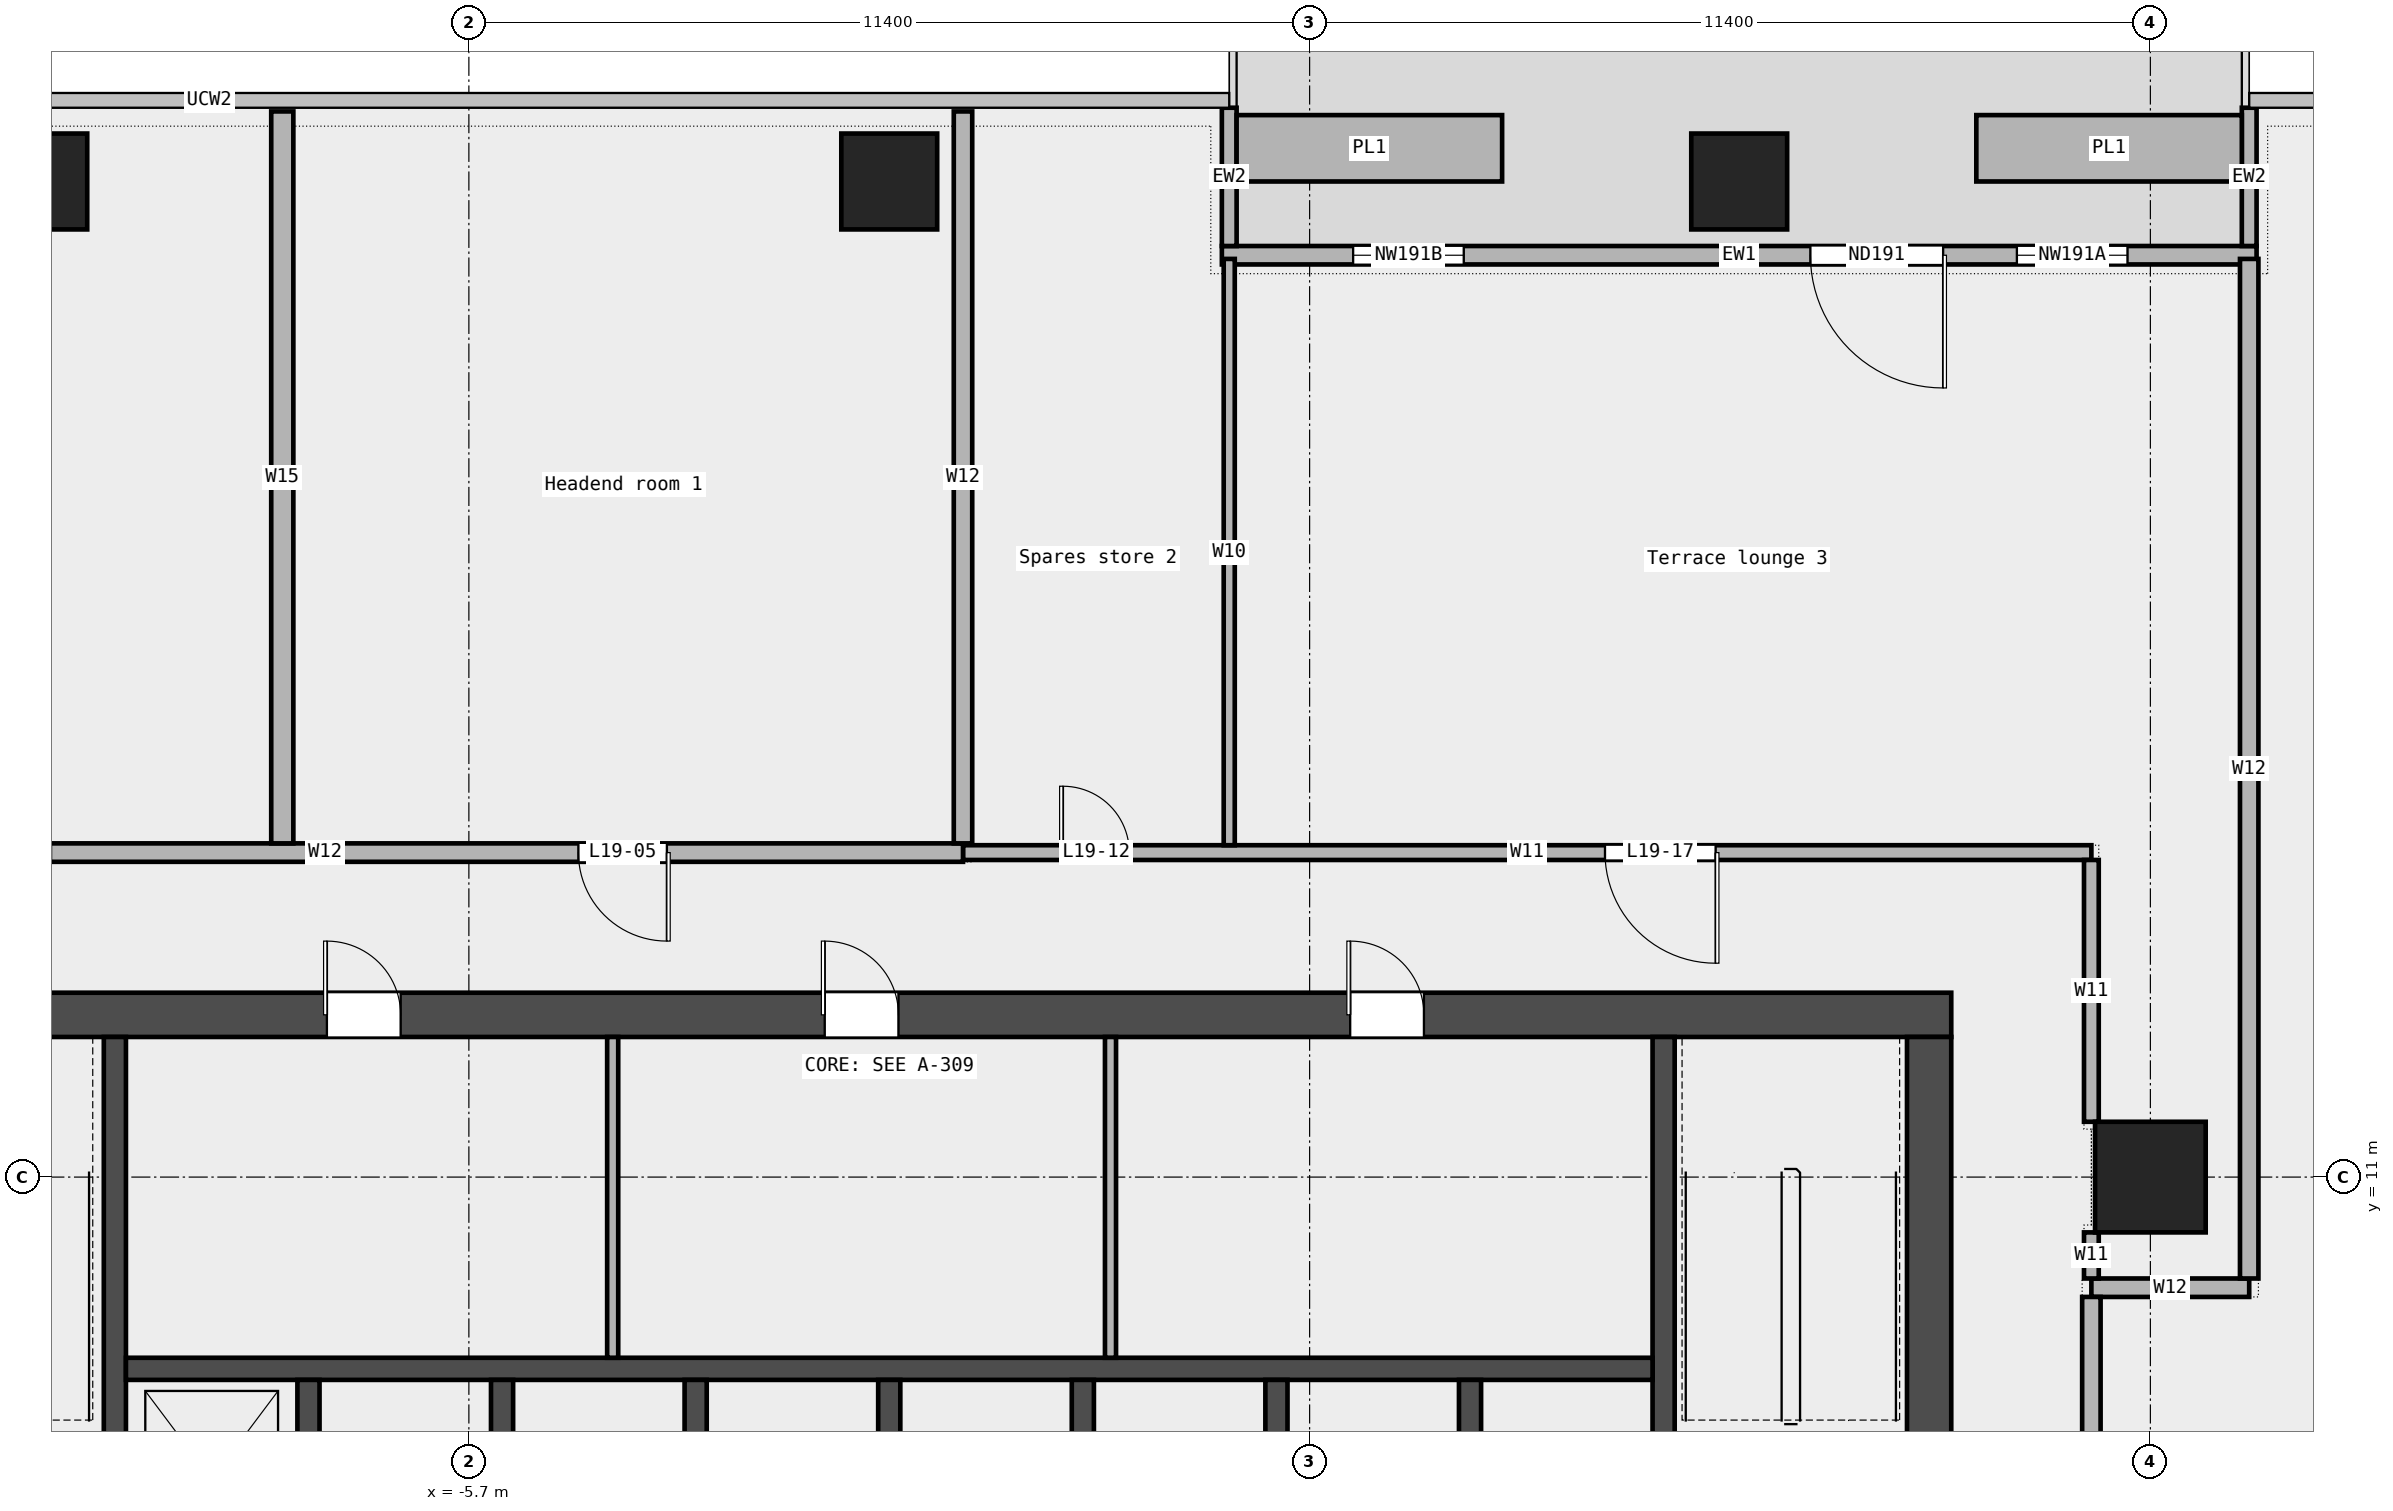
"""IFC4 building model, lengths in metres.
Left out: names, types, materials, properties, quantities, classifications, styles, units other than length and angle.
Written with IfcOpenShell. Run it as: python <this file> out.ifc"""

import sys

from ifc_helpers import new_model, si_unit, direction, frame, frame_2d, origin, origin_2d, place, context, subcontext, project, spatial, rectangle, extrude, element, fill, save


model = new_model("IFC4")
c1 = context("Model", 3, precision=1e-05, world=origin(), true_north=direction((0.0, 1.0)))
c2 = subcontext(c1, "Body", "Model", "MODEL_VIEW")
j1 = project(units=[si_unit("LENGTHUNIT", "METRE"), si_unit("PLANEANGLEUNIT", "RADIAN")], contexts=[c1])
p1 = place(None, origin())
s1 = spatial("IfcSite", under=j1, at=p1, CompositionType="ELEMENT")
p2 = place(p1, origin())
s2 = spatial("IfcBuilding", under=s1, at=p2, CompositionType="ELEMENT")
p3 = place(p2, frame((0.0, 0.0, 99.1)))
s3 = spatial("IfcBuildingStorey", under=s2, at=p3, CompositionType="ELEMENT", Elevation=99.1)
for number, where, z_axis, x_axis in (
    (1, (11.525, 24.5, 0.0), (0.0, 0.0, 1.0), (1.0, 0.0, 0.0)),
    (2, (0.0, 24.5, 0.0), (0.0, 0.0, 1.0), (1.0, 0.0, 0.0)),
    (3, (-11.525, 24.5, 0.0), (0.0, 0.0, 1.0), (1.0, 0.0, 0.0)),
):
    element("IfcColumn", number, at=place(p3, frame(where, z_axis=z_axis, x_axis=x_axis)), inside=s3, PredefinedType="COLUMN", context=c2, shape_type="SweptSolid", body=[
        extrude(rectangle(XDim=1.3, YDim=1.3, at=origin_2d()), origin(), (0.0, 0.0, 1.0), 4.05),
    ])
p4 = place(p3, frame((17.1, 11.0, 0.0), z_axis=(0.0, 0.0, 1.0), x_axis=(1.0, 0.0, 0.0)))
e4 = element("IfcColumn", 4, at=p4, inside=s3, PredefinedType="COLUMN", context=c2, shape_type="SweptSolid", body=[
    extrude(rectangle(XDim=1.5, YDim=1.5, at=origin_2d()), origin(), (0.0, 0.0, 1.0), 4.05),
])
p5 = place(p3, frame((18.54, 23.5, 0.0), z_axis=(0.0, 0.0, 1.0), x_axis=(-1.0, 0.0, 0.0)))
e5 = element("IfcWall", 5, at=p5, inside=s3, PredefinedType="STANDARD", context=c2, shape_type="SweptSolid", body=[
    extrude(rectangle(XDim=14.03, YDim=0.25, at=frame_2d((7.015, 0.0))), origin(), (0.0, 0.0, 1.0), 4.05),
])
p6 = place(p5, frame((1.75, 0.0, 0.45)))
e6 = element("IfcOpeningElement", 6, at=p6, cuts=e5, PredefinedType="OPENING", context=c2, shape_type="SweptSolid", body=[
    extrude(rectangle(XDim=1.5, YDim=3.0, at=frame_2d((0.75, 1.5))), frame((0.0, 0.137, 0.0), z_axis=(0.0, -1.0, 0.0), x_axis=(1.0, 0.0, 0.0)), (0.0, 0.0, 1.0), 0.274),
])
p7 = place(p5, frame((4.25, 0.0, 0.0)))
e7 = element("IfcOpeningElement", 7, at=p7, cuts=e5, PredefinedType="OPENING", context=c2, shape_type="SweptSolid", body=[
    extrude(rectangle(XDim=1.8, YDim=2.4, at=frame_2d((0.9, 1.2))), frame((0.0, 0.137, 0.0), z_axis=(0.0, -1.0, 0.0), x_axis=(1.0, 0.0, 0.0)), (0.0, 0.0, 1.0), 0.274),
])
p8 = place(p5, frame((10.75, 0.0, 0.45)))
e8 = element("IfcOpeningElement", 8, at=p8, cuts=e5, PredefinedType="OPENING", context=c2, shape_type="SweptSolid", body=[
    extrude(rectangle(XDim=1.5, YDim=3.0, at=frame_2d((0.75, 1.5))), frame((0.0, 0.137, 0.0), z_axis=(0.0, -1.0, 0.0), x_axis=(1.0, 0.0, 0.0)), (0.0, 0.0, 1.0), 0.274),
])
for number, where, z_axis, x_axis in (
    (9, (18.44, 25.5, 0.0), (0.0, 0.0, 1.0), (0.0, -1.0, 0.0)),
    (10, (4.61, 25.5, 0.0), (0.0, 0.0, 1.0), (0.0, -1.0, 0.0)),
):
    element("IfcWall", number, at=place(p3, frame(where, z_axis=z_axis, x_axis=x_axis)), inside=s3, PredefinedType="STANDARD", context=c2, shape_type="SweptSolid", body=[
        extrude(rectangle(XDim=1.875, YDim=0.2, at=frame_2d((0.938, 0.0))), origin(), (0.0, 0.0, 1.0), 4.05),
    ])
for number, where, z_axis, x_axis in (
    (11, (18.34, 24.95, 0.0), (0.0, 0.0, 1.0), (-1.0, 0.0, 0.0)),
    (12, (8.31, 24.95, 0.0), (0.0, 0.0, 1.0), (-1.0, 0.0, 0.0)),
):
    element("IfcWall", number, at=place(p3, frame(where, z_axis=z_axis, x_axis=x_axis)), inside=s3, PredefinedType="STANDARD", context=c2, shape_type="SweptSolid", body=[
        extrude(rectangle(XDim=3.6, YDim=0.9, at=frame_2d((1.8, 0.0))), origin(), (0.0, 0.0, 1.0), 0.7),
    ])
p9 = place(p3, frame((16.3, 9.5, 0.0), z_axis=(0.0, 0.0, 1.0), x_axis=(1.0, 0.0, 0.0)))
e13 = element("IfcWall", 13, at=p9, inside=s3, PredefinedType="PARTITIONING", context=c2, shape_type="SweptSolid", body=[
    extrude(rectangle(XDim=2.14, YDim=0.25, at=frame_2d((1.07, 0.0))), origin(), (0.0, 0.0, 1.0), 4.05),
])
p10 = place(p3, frame((1.0, 15.4, 0.0), z_axis=(0.0, 0.0, 1.0), x_axis=(1.0, 0.0, 0.0)))
e14 = element("IfcWall", 14, at=p10, inside=s3, PredefinedType="PARTITIONING", context=c2, shape_type="SweptSolid", body=[
    extrude(rectangle(XDim=15.3, YDim=0.2, at=frame_2d((7.65, 0.0))), origin(), (0.0, 0.0, 1.0), 4.05),
])
p11 = place(p10, frame((1.355, 0.0, 0.0)))
e15 = element("IfcOpeningElement", 15, at=p11, cuts=e14, PredefinedType="OPENING", context=c2, shape_type="SweptSolid", body=[
    extrude(rectangle(XDim=0.9, YDim=2.1, at=frame_2d((0.45, 1.05))), frame((0.0, 0.112, 0.0), z_axis=(0.0, -1.0, 0.0), x_axis=(1.0, 0.0, 0.0)), (0.0, 0.0, 1.0), 0.224),
])
p12 = place(p10, frame((8.705, 0.0, 0.0)))
e16 = element("IfcOpeningElement", 16, at=p12, cuts=e14, PredefinedType="OPENING", context=c2, shape_type="SweptSolid", body=[
    extrude(rectangle(XDim=1.5, YDim=2.1, at=frame_2d((0.75, 1.05))), frame((0.0, 0.112, 0.0), z_axis=(0.0, -1.0, 0.0), x_axis=(1.0, 0.0, 0.0)), (0.0, 0.0, 1.0), 0.224),
])
p13 = place(p3, frame((-16.3, 15.4, 0.0), z_axis=(0.0, 0.0, 1.0), x_axis=(1.0, 0.0, 0.0)))
e17 = element("IfcWall", 17, at=p13, inside=s3, PredefinedType="PARTITIONING", context=c2, shape_type="SweptSolid", body=[
    extrude(rectangle(XDim=17.3, YDim=0.25, at=frame_2d((8.65, 0.0))), origin(), (0.0, 0.0, 1.0), 4.05),
])
p14 = place(p13, frame((12.085, 0.0, 0.0)))
e18 = element("IfcOpeningElement", 18, at=p14, cuts=e17, PredefinedType="OPENING", context=c2, shape_type="SweptSolid", body=[
    extrude(rectangle(XDim=1.2, YDim=2.1, at=frame_2d((0.6, 1.05))), frame((0.0, 0.137, 0.0), z_axis=(0.0, -1.0, 0.0), x_axis=(1.0, 0.0, 0.0)), (0.0, 0.0, 1.0), 0.274),
])
p15 = place(p13, frame((3.135, 0.0, 0.0)))
e19 = element("IfcOpeningElement", 19, at=p15, cuts=e17, PredefinedType="OPENING", context=c2, shape_type="SweptSolid", body=[
    extrude(rectangle(XDim=1.8, YDim=2.1, at=frame_2d((0.9, 1.05))), frame((0.0, 0.137, 0.0), z_axis=(0.0, -1.0, 0.0), x_axis=(1.0, 0.0, 0.0)), (0.0, 0.0, 1.0), 0.274),
])
p16 = place(p3, frame((-8.23, 15.525, 0.0), z_axis=(0.0, 0.0, 1.0), x_axis=(0.0, 1.0, 0.0)))
e20 = element("IfcWall", 20, at=p16, inside=s3, PredefinedType="PARTITIONING", context=c2, shape_type="SweptSolid", body=[
    extrude(rectangle(XDim=9.925, YDim=0.3, at=frame_2d((4.962, 0.0))), origin(), (0.0, 0.0, 1.0), 4.05),
])
p17 = place(p3, frame((1.0, 15.525, 0.0), z_axis=(0.0, 0.0, 1.0), x_axis=(0.0, 1.0, 0.0)))
e21 = element("IfcWall", 21, at=p17, inside=s3, PredefinedType="PARTITIONING", context=c2, shape_type="SweptSolid", body=[
    extrude(rectangle(XDim=9.925, YDim=0.25, at=frame_2d((4.962, 0.0))), origin(), (0.0, 0.0, 1.0), 4.05),
])
p18 = place(p3, frame((4.61, 15.5, 0.0), z_axis=(0.0, 0.0, 1.0), x_axis=(0.0, 1.0, 0.0)))
e22 = element("IfcWall", 22, at=p18, inside=s3, PredefinedType="PARTITIONING", context=c2, shape_type="SweptSolid", body=[
    extrude(rectangle(XDim=7.95, YDim=0.15, at=frame_2d((3.975, 0.0))), origin(), (0.0, 0.0, 1.0), 4.05),
])
p19 = place(p3, frame((16.3, 9.625, 0.0), z_axis=(0.0, 0.0, 1.0), x_axis=(0.0, 1.0, 0.0)))
e23 = element("IfcWall", 23, at=p19, inside=s3, PredefinedType="PARTITIONING", context=c2, shape_type="SweptSolid", body=[
    extrude(rectangle(XDim=0.625, YDim=0.2, at=frame_2d((0.312, 0.0))), origin(), (0.0, 0.0, 1.0), 4.05),
])
p20 = place(p3, frame((16.3, 11.75, 0.0), z_axis=(0.0, 0.0, 1.0), x_axis=(0.0, 1.0, 0.0)))
e24 = element("IfcWall", 24, at=p20, inside=s3, PredefinedType="PARTITIONING", context=c2, shape_type="SweptSolid", body=[
    extrude(rectangle(XDim=3.55, YDim=0.2, at=frame_2d((1.775, 0.0))), origin(), (0.0, 0.0, 1.0), 4.05),
])
p21 = place(p3, frame((16.3, 1.525, 0.0), z_axis=(0.0, 0.0, 1.0), x_axis=(0.0, 1.0, 0.0)))
e25 = element("IfcWall", 25, at=p21, inside=s3, PredefinedType="PARTITIONING", context=c2, shape_type="SweptSolid", body=[
    extrude(rectangle(XDim=7.85, YDim=0.25, at=frame_2d((3.925, 0.0))), origin(), (0.0, 0.0, 1.0), 4.05),
])
p22 = place(p21, frame((2.538, 0.0, 0.0)))
e26 = element("IfcOpeningElement", 26, at=p22, cuts=e25, PredefinedType="OPENING", context=c2, shape_type="SweptSolid", body=[
    extrude(rectangle(XDim=1.8, YDim=2.1, at=frame_2d((0.9, 1.05))), frame((0.0, 0.137, 0.0), z_axis=(0.0, -1.0, 0.0), x_axis=(1.0, 0.0, 0.0)), (0.0, 0.0, 1.0), 0.274),
])
p23 = place(p3, frame((18.44, 9.625, 0.0), z_axis=(0.0, 0.0, 1.0), x_axis=(0.0, 1.0, 0.0)))
e27 = element("IfcWall", 27, at=p23, inside=s3, PredefinedType="PARTITIONING", context=c2, shape_type="SweptSolid", body=[
    extrude(rectangle(XDim=13.825, YDim=0.25, at=frame_2d((6.913, 0.0))), origin(), (0.0, 0.0, 1.0), 4.05),
])
p24 = place(p3, frame((-14.4, 13.2, 0.0), z_axis=(0.0, 0.0, 1.0), x_axis=(1.0, 0.0, 0.0)))
e28 = element("IfcWall", 28, at=p24, inside=s3, PredefinedType="SHEAR", context=c2, shape_type="SweptSolid", body=[
    extrude(rectangle(XDim=28.8, YDim=0.6, at=frame_2d((14.4, 0.0))), origin(), (0.0, 0.0, 1.0), 4.2),
])
p25 = place(p24, frame((6.775, 0.0, 0.0)))
e29 = element("IfcOpeningElement", 29, at=p25, cuts=e28, PredefinedType="OPENING", context=c2, shape_type="SweptSolid", body=[
    extrude(rectangle(XDim=1.0, YDim=2.1, at=frame_2d((0.5, 1.05))), frame((0.0, 0.312, 0.0), z_axis=(0.0, -1.0, 0.0), x_axis=(1.0, 0.0, 0.0)), (0.0, 0.0, 1.0), 0.624),
])
p26 = place(p24, frame((13.525, 0.0, 0.0)))
e30 = element("IfcOpeningElement", 30, at=p26, cuts=e28, PredefinedType="OPENING", context=c2, shape_type="SweptSolid", body=[
    extrude(rectangle(XDim=1.0, YDim=2.1, at=frame_2d((0.5, 1.05))), frame((0.0, 0.312, 0.0), z_axis=(0.0, -1.0, 0.0), x_axis=(1.0, 0.0, 0.0)), (0.0, 0.0, 1.0), 0.624),
])
p27 = place(p24, frame((20.65, 0.0, 0.0)))
e31 = element("IfcOpeningElement", 31, at=p27, cuts=e28, PredefinedType="OPENING", context=c2, shape_type="SweptSolid", body=[
    extrude(rectangle(XDim=1.0, YDim=2.1, at=frame_2d((0.5, 1.05))), frame((0.0, 0.312, 0.0), z_axis=(0.0, -1.0, 0.0), x_axis=(1.0, 0.0, 0.0)), (0.0, 0.0, 1.0), 0.624),
])
p28 = place(p3, frame((14.1, -6.6, 0.0), z_axis=(0.0, 0.0, 1.0), x_axis=(0.0, 1.0, 0.0)))
e32 = element("IfcWall", 32, at=p28, inside=s3, PredefinedType="SHEAR", context=c2, shape_type="SweptSolid", body=[
    extrude(rectangle(XDim=19.5, YDim=0.6, at=frame_2d((9.75, 0.0))), origin(), (0.0, 0.0, 1.0), 4.2),
])
p29 = place(p28, frame((9.3, 0.0, 0.0)))
e33 = element("IfcOpeningElement", 33, at=p29, cuts=e32, PredefinedType="OPENING", context=c2, shape_type="SweptSolid", body=[
    extrude(rectangle(XDim=1.8, YDim=2.1, at=frame_2d((0.9, 1.05))), frame((0.0, 0.312, 0.0), z_axis=(0.0, -1.0, 0.0), x_axis=(1.0, 0.0, 0.0)), (0.0, 0.0, 1.0), 0.624),
])
for number, where, z_axis, x_axis in (
    (34, (-10.5, 5.25, 0.0), (0.0, 0.0, 1.0), (0.0, 1.0, 0.0)),
    (35, (10.5, 5.25, 0.0), (0.0, 0.0, 1.0), (0.0, 1.0, 0.0)),
):
    element("IfcWall", number, at=place(p3, frame(where, z_axis=z_axis, x_axis=x_axis)), inside=s3, PredefinedType="SHEAR", context=c2, shape_type="SweptSolid", body=[
        extrude(rectangle(XDim=7.65, YDim=0.3, at=frame_2d((3.825, 0.0))), origin(), (0.0, 0.0, 1.0), 4.2),
    ])
p30 = place(p3, frame((-10.35, 8.4, 0.0), z_axis=(0.0, 0.0, 1.0), x_axis=(1.0, 0.0, 0.0)))
e36 = element("IfcWall", 36, at=p30, inside=s3, PredefinedType="SOLIDWALL", context=c2, shape_type="SweptSolid", body=[
    extrude(rectangle(XDim=20.7, YDim=0.3, at=frame_2d((10.35, 0.0))), origin(), (0.0, 0.0, 1.0), 4.2),
])
for number, where, z_axis, x_axis in (
    (37, (-7.875, 5.55, 0.0), (0.0, 0.0, 1.0), (0.0, 1.0, 0.0)),
    (38, (-5.25, 5.55, 0.0), (0.0, 0.0, 1.0), (0.0, 1.0, 0.0)),
    (39, (-2.625, 5.55, 0.0), (0.0, 0.0, 1.0), (0.0, 1.0, 0.0)),
    (40, (0.0, 5.55, 0.0), (0.0, 0.0, 1.0), (0.0, 1.0, 0.0)),
    (41, (2.625, 5.55, 0.0), (0.0, 0.0, 1.0), (0.0, 1.0, 0.0)),
    (42, (5.25, 5.55, 0.0), (0.0, 0.0, 1.0), (0.0, 1.0, 0.0)),
    (43, (7.875, 5.55, 0.0), (0.0, 0.0, 1.0), (0.0, 1.0, 0.0)),
):
    element("IfcWall", number, at=place(p3, frame(where, z_axis=z_axis, x_axis=x_axis)), inside=s3, PredefinedType="SOLIDWALL", context=c2, shape_type="SweptSolid", body=[
        extrude(rectangle(XDim=2.7, YDim=0.3, at=frame_2d((1.35, 0.0))), origin(), (0.0, 0.0, 1.0), 4.2),
    ])
for number, where, z_axis, x_axis in (
    (44, (-3.75, 8.55, 0.0), (0.0, 0.0, 1.0), (0.0, 1.0, 0.0)),
    (45, (3.0, 8.55, 0.0), (0.0, 0.0, 1.0), (0.0, 1.0, 0.0)),
):
    element("IfcWall", number, at=place(p3, frame(where, z_axis=z_axis, x_axis=x_axis)), inside=s3, PredefinedType="PARTITIONING", context=c2, shape_type="SweptSolid", body=[
        extrude(rectangle(XDim=4.35, YDim=0.15, at=frame_2d((2.175, 0.0))), origin(), (0.0, 0.0, 1.0), 4.2),
    ])
p31 = place(p6, origin())
e46 = element("IfcWindow", 46, at=p31, inside=s3, PartitioningType="SINGLE_PANEL", PredefinedType="WINDOW", context=c2, shape_type="SweptSolid", body=[
    extrude(rectangle(XDim=1.5, YDim=3.0, at=frame_2d((0.75, 1.5))), frame((0.0, 0.03, 0.0), z_axis=(0.0, -1.0, 0.0), x_axis=(1.0, 0.0, 0.0)), (0.0, 0.0, 1.0), 0.06),
])
fill(e6, e46)
p32 = place(p7, origin())
e47 = element("IfcDoor", 47, at=p32, inside=s3, OperationType="DOUBLE_DOOR_SINGLE_SWING", PredefinedType="DOOR", context=c2, shape_type="SweptSolid", body=[
    extrude(rectangle(XDim=1.8, YDim=2.4, at=frame_2d((0.9, 1.2))), frame((0.0, 0.025, 0.0), z_axis=(0.0, -1.0, 0.0), x_axis=(1.0, 0.0, 0.0)), (0.0, 0.0, 1.0), 0.05),
])
fill(e7, e47)
p33 = place(p8, origin())
e48 = element("IfcWindow", 48, at=p33, inside=s3, PartitioningType="SINGLE_PANEL", PredefinedType="WINDOW", context=c2, shape_type="SweptSolid", body=[
    extrude(rectangle(XDim=1.5, YDim=3.0, at=frame_2d((0.75, 1.5))), frame((0.0, 0.03, 0.0), z_axis=(0.0, -1.0, 0.0), x_axis=(1.0, 0.0, 0.0)), (0.0, 0.0, 1.0), 0.06),
])
fill(e8, e48)
p34 = place(p14, origin())
e49 = element("IfcDoor", 49, at=p34, inside=s3, OperationType="SINGLE_SWING_LEFT", PredefinedType="DOOR", context=c2, shape_type="SweptSolid", body=[
    extrude(rectangle(XDim=1.2, YDim=2.1, at=frame_2d((0.6, 1.05))), frame((0.0, 0.025, 0.0), z_axis=(0.0, -1.0, 0.0), x_axis=(1.0, 0.0, 0.0)), (0.0, 0.0, 1.0), 0.05),
])
fill(e18, e49)
p35 = place(p11, origin())
e50 = element("IfcDoor", 50, at=p35, inside=s3, OperationType="SINGLE_SWING_LEFT", PredefinedType="DOOR", context=c2, shape_type="SweptSolid", body=[
    extrude(rectangle(XDim=0.9, YDim=2.1, at=frame_2d((0.45, 1.05))), frame((0.0, 0.025, 0.0), z_axis=(0.0, -1.0, 0.0), x_axis=(1.0, 0.0, 0.0)), (0.0, 0.0, 1.0), 0.05),
])
fill(e15, e50)
p36 = place(p12, origin())
e51 = element("IfcDoor", 51, at=p36, inside=s3, OperationType="DOUBLE_DOOR_SINGLE_SWING", PredefinedType="DOOR", context=c2, shape_type="SweptSolid", body=[
    extrude(rectangle(XDim=1.5, YDim=2.1, at=frame_2d((0.75, 1.05))), frame((0.0, 0.025, 0.0), z_axis=(0.0, -1.0, 0.0), x_axis=(1.0, 0.0, 0.0)), (0.0, 0.0, 1.0), 0.05),
])
fill(e16, e51)
p37 = place(p25, origin())
e52 = element("IfcDoor", 52, at=p37, inside=s3, OperationType="SINGLE_SWING_LEFT", PredefinedType="DOOR", context=c2, shape_type="SweptSolid", body=[
    extrude(rectangle(XDim=1.0, YDim=2.1, at=frame_2d((0.5, 1.05))), frame((0.0, 0.025, 0.0), z_axis=(0.0, -1.0, 0.0), x_axis=(1.0, 0.0, 0.0)), (0.0, 0.0, 1.0), 0.05),
])
fill(e29, e52)
p38 = place(p26, origin())
e53 = element("IfcDoor", 53, at=p38, inside=s3, OperationType="SINGLE_SWING_LEFT", PredefinedType="DOOR", context=c2, shape_type="SweptSolid", body=[
    extrude(rectangle(XDim=1.0, YDim=2.1, at=frame_2d((0.5, 1.05))), frame((0.0, 0.025, 0.0), z_axis=(0.0, -1.0, 0.0), x_axis=(1.0, 0.0, 0.0)), (0.0, 0.0, 1.0), 0.05),
])
fill(e30, e53)
p39 = place(p27, origin())
e54 = element("IfcDoor", 54, at=p39, inside=s3, OperationType="SINGLE_SWING_LEFT", PredefinedType="DOOR", context=c2, shape_type="SweptSolid", body=[
    extrude(rectangle(XDim=1.0, YDim=2.1, at=frame_2d((0.5, 1.05))), frame((0.0, 0.025, 0.0), z_axis=(0.0, -1.0, 0.0), x_axis=(1.0, 0.0, 0.0)), (0.0, 0.0, 1.0), 0.05),
])
fill(e31, e54)
save(model, sys.argv[1])
